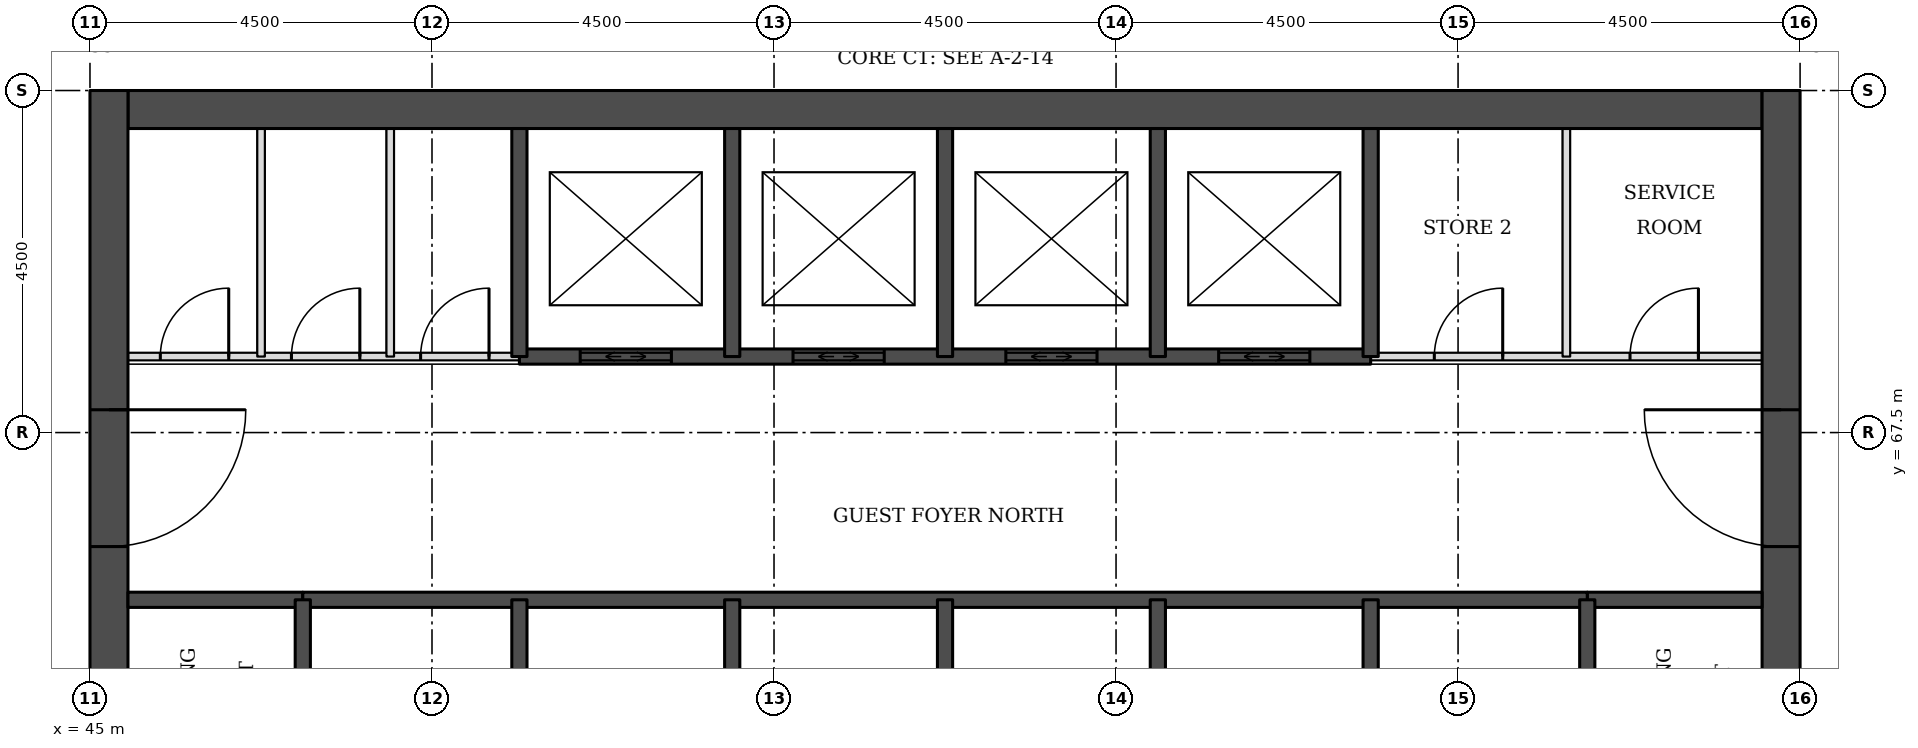
"""IFC4 building model, lengths in metres.
Left out: names, types, materials, properties, quantities, classifications, styles, units other than length and angle.
Written with IfcOpenShell. Run it as: python <this file> out.ifc"""

import sys

from ifc_helpers import new_model, si_unit, direction, frame, frame_2d, origin, place, context, subcontext, project, spatial, rectangle, extrude, element, fill, save


model = new_model("IFC4")
c1 = context("Model", 3, precision=1e-05, world=origin(), true_north=direction((0.0, 1.0)))
c2 = subcontext(c1, "Body", "Model", "MODEL_VIEW")
j1 = project(units=[si_unit("LENGTHUNIT", "METRE"), si_unit("PLANEANGLEUNIT", "RADIAN")], contexts=[c1])
p1 = place(None, origin())
s1 = spatial("IfcSite", under=j1, at=p1, CompositionType="ELEMENT")
p2 = place(p1, origin())
s2 = spatial("IfcBuilding", under=s1, at=p2, CompositionType="ELEMENT")
p3 = place(p2, frame((0.0, 0.0, 46.2)))
s3 = spatial("IfcBuildingStorey", under=s2, at=p3, CompositionType="ELEMENT", Elevation=46.2)
p4 = place(p3, frame((45.5, 71.75, 0.0), z_axis=(0.0, 0.0, 1.0), x_axis=(1.0, 0.0, 0.0)))
e1 = element("IfcWall", 1, at=p4, inside=s3, PredefinedType="SHEAR", context=c2, shape_type="SweptSolid", body=[
    extrude(rectangle(XDim=21.5, YDim=0.5, at=frame_2d((10.75, 0.0))), origin(), (0.0, 0.0, 1.0), 3.3),
])
p5 = place(p3, frame((45.25, 49.5, 0.0), z_axis=(0.0, 0.0, 1.0), x_axis=(0.0, 1.0, 0.0)))
e2 = element("IfcWall", 2, at=p5, inside=s3, PredefinedType="SHEAR", context=c2, shape_type="SweptSolid", body=[
    extrude(rectangle(XDim=22.5, YDim=0.5, at=frame_2d((11.25, 0.0))), origin(), (0.0, 0.0, 1.0), 3.3),
])
p6 = place(p5, frame((4.2, 0.0, 0.0)))
e3 = element("IfcOpeningElement", 3, at=p6, cuts=e2, PredefinedType="OPENING", context=c2, shape_type="SweptSolid", body=[
    extrude(rectangle(XDim=1.8, YDim=2.1, at=frame_2d((0.9, 1.05))), frame((0.0, 0.26, 0.0), z_axis=(0.0, -1.0, 0.0), x_axis=(1.0, 0.0, 0.0)), (0.0, 0.0, 1.0), 0.52),
])
p7 = place(p5, frame((6.9, 0.0, 0.0)))
e4 = element("IfcOpeningElement", 4, at=p7, cuts=e2, PredefinedType="OPENING", context=c2, shape_type="SweptSolid", body=[
    extrude(rectangle(XDim=1.1, YDim=2.1, at=frame_2d((0.55, 1.05))), frame((0.0, 0.26, 0.0), z_axis=(0.0, -1.0, 0.0), x_axis=(1.0, 0.0, 0.0)), (0.0, 0.0, 1.0), 0.52),
])
p8 = place(p5, frame((13.6, 0.0, 0.0)))
e5 = element("IfcOpeningElement", 5, at=p8, cuts=e2, PredefinedType="OPENING", context=c2, shape_type="SweptSolid", body=[
    extrude(rectangle(XDim=1.1, YDim=2.1, at=frame_2d((0.55, 1.05))), frame((0.0, 0.26, 0.0), z_axis=(0.0, -1.0, 0.0), x_axis=(1.0, 0.0, 0.0)), (0.0, 0.0, 1.0), 0.52),
])
p9 = place(p5, frame((16.5, 0.0, 0.0)))
e6 = element("IfcOpeningElement", 6, at=p9, cuts=e2, PredefinedType="OPENING", context=c2, shape_type="SweptSolid", body=[
    extrude(rectangle(XDim=1.8, YDim=2.1, at=frame_2d((0.9, 1.05))), frame((0.0, 0.26, 0.0), z_axis=(0.0, -1.0, 0.0), x_axis=(1.0, 0.0, 0.0)), (0.0, 0.0, 1.0), 0.52),
])
p10 = place(p3, frame((67.25, 49.5, 0.0), z_axis=(0.0, 0.0, 1.0), x_axis=(0.0, 1.0, 0.0)))
e7 = element("IfcWall", 7, at=p10, inside=s3, PredefinedType="SHEAR", context=c2, shape_type="SweptSolid", body=[
    extrude(rectangle(XDim=22.5, YDim=0.5, at=frame_2d((11.25, 0.0))), origin(), (0.0, 0.0, 1.0), 3.3),
])
p11 = place(p10, frame((4.2, 0.0, 0.0)))
e8 = element("IfcOpeningElement", 8, at=p11, cuts=e7, PredefinedType="OPENING", context=c2, shape_type="SweptSolid", body=[
    extrude(rectangle(XDim=1.8, YDim=2.1, at=frame_2d((0.9, 1.05))), frame((0.0, 0.26, 0.0), z_axis=(0.0, -1.0, 0.0), x_axis=(1.0, 0.0, 0.0)), (0.0, 0.0, 1.0), 0.52),
])
p12 = place(p10, frame((6.9, 0.0, 0.0)))
e9 = element("IfcOpeningElement", 9, at=p12, cuts=e7, PredefinedType="OPENING", context=c2, shape_type="SweptSolid", body=[
    extrude(rectangle(XDim=1.1, YDim=2.1, at=frame_2d((0.55, 1.05))), frame((0.0, 0.26, 0.0), z_axis=(0.0, -1.0, 0.0), x_axis=(1.0, 0.0, 0.0)), (0.0, 0.0, 1.0), 0.52),
])
p13 = place(p10, frame((13.6, 0.0, 0.0)))
e10 = element("IfcOpeningElement", 10, at=p13, cuts=e7, PredefinedType="OPENING", context=c2, shape_type="SweptSolid", body=[
    extrude(rectangle(XDim=1.1, YDim=2.1, at=frame_2d((0.55, 1.05))), frame((0.0, 0.26, 0.0), z_axis=(0.0, -1.0, 0.0), x_axis=(1.0, 0.0, 0.0)), (0.0, 0.0, 1.0), 0.52),
])
p14 = place(p10, frame((16.5, 0.0, 0.0)))
e11 = element("IfcOpeningElement", 11, at=p14, cuts=e7, PredefinedType="OPENING", context=c2, shape_type="SweptSolid", body=[
    extrude(rectangle(XDim=1.8, YDim=2.1, at=frame_2d((0.9, 1.05))), frame((0.0, 0.26, 0.0), z_axis=(0.0, -1.0, 0.0), x_axis=(1.0, 0.0, 0.0)), (0.0, 0.0, 1.0), 0.52),
])
for number, where, z_axis, x_axis in (
    (12, (45.5, 65.3, 0.0), (0.0, 0.0, 1.0), (1.0, 0.0, 0.0)),
    (13, (64.7, 65.3, 0.0), (0.0, 0.0, 1.0), (1.0, 0.0, 0.0)),
):
    element("IfcWall", number, at=place(p3, frame(where, z_axis=z_axis, x_axis=x_axis)), inside=s3, PredefinedType="SOLIDWALL", context=c2, shape_type="SweptSolid", body=[
        extrude(rectangle(XDim=2.3, YDim=0.2, at=frame_2d((1.15, 0.0))), origin(), (0.0, 0.0, 1.0), 3.08),
    ])
p15 = place(p3, frame((47.8, 65.3, 0.0), z_axis=(0.0, 0.0, 1.0), x_axis=(1.0, 0.0, 0.0)))
e14 = element("IfcWall", 14, at=p15, inside=s3, PredefinedType="SOLIDWALL", context=c2, shape_type="SweptSolid", body=[
    extrude(rectangle(XDim=16.9, YDim=0.2, at=frame_2d((8.45, 0.0))), origin(), (0.0, 0.0, 1.0), 3.08),
])
p16 = place(p3, frame((45.5, 68.5, 0.0), z_axis=(0.0, 0.0, 1.0), x_axis=(1.0, 0.0, 0.0)))
e15 = element("IfcWall", 15, at=p16, inside=s3, PredefinedType="PARTITIONING", context=c2, shape_type="SweptSolid", body=[
    extrude(rectangle(XDim=5.15, YDim=0.1, at=frame_2d((2.575, 0.0))), origin(), (0.0, 0.0, 1.0), 3.08),
])
p17 = place(p16, frame((0.426, 0.0, 0.0)))
e16 = element("IfcOpeningElement", 16, at=p17, cuts=e15, PredefinedType="OPENING", context=c2, shape_type="SweptSolid", body=[
    extrude(rectangle(XDim=0.9, YDim=2.1, at=frame_2d((0.45, 1.05))), frame((0.0, 0.06, 0.0), z_axis=(0.0, -1.0, 0.0), x_axis=(1.0, 0.0, 0.0)), (0.0, 0.0, 1.0), 0.12),
])
p18 = place(p16, frame((2.151, 0.0, 0.0)))
e17 = element("IfcOpeningElement", 17, at=p18, cuts=e15, PredefinedType="OPENING", context=c2, shape_type="SweptSolid", body=[
    extrude(rectangle(XDim=0.9, YDim=2.1, at=frame_2d((0.45, 1.05))), frame((0.0, 0.06, 0.0), z_axis=(0.0, -1.0, 0.0), x_axis=(1.0, 0.0, 0.0)), (0.0, 0.0, 1.0), 0.12),
])
p19 = place(p16, frame((3.85, 0.0, 0.0)))
e18 = element("IfcOpeningElement", 18, at=p19, cuts=e15, PredefinedType="OPENING", context=c2, shape_type="SweptSolid", body=[
    extrude(rectangle(XDim=0.9, YDim=2.1, at=frame_2d((0.45, 1.05))), frame((0.0, 0.06, 0.0), z_axis=(0.0, -1.0, 0.0), x_axis=(1.0, 0.0, 0.0)), (0.0, 0.0, 1.0), 0.12),
])
p20 = place(p3, frame((61.85, 68.5, 0.0), z_axis=(0.0, 0.0, 1.0), x_axis=(1.0, 0.0, 0.0)))
e19 = element("IfcWall", 19, at=p20, inside=s3, PredefinedType="PARTITIONING", context=c2, shape_type="SweptSolid", body=[
    extrude(rectangle(XDim=5.15, YDim=0.1, at=frame_2d((2.575, 0.0))), origin(), (0.0, 0.0, 1.0), 3.08),
])
p21 = place(p20, frame((3.413, 0.0, 0.0)))
e20 = element("IfcOpeningElement", 20, at=p21, cuts=e19, PredefinedType="OPENING", context=c2, shape_type="SweptSolid", body=[
    extrude(rectangle(XDim=0.9, YDim=2.1, at=frame_2d((0.45, 1.05))), frame((0.0, 0.06, 0.0), z_axis=(0.0, -1.0, 0.0), x_axis=(1.0, 0.0, 0.0)), (0.0, 0.0, 1.0), 0.12),
])
p22 = place(p20, frame((0.837, 0.0, 0.0)))
e21 = element("IfcOpeningElement", 21, at=p22, cuts=e19, PredefinedType="OPENING", context=c2, shape_type="SweptSolid", body=[
    extrude(rectangle(XDim=0.9, YDim=2.1, at=frame_2d((0.45, 1.05))), frame((0.0, 0.06, 0.0), z_axis=(0.0, -1.0, 0.0), x_axis=(1.0, 0.0, 0.0)), (0.0, 0.0, 1.0), 0.12),
])
p23 = place(p3, frame((50.65, 68.5, 0.0), z_axis=(0.0, 0.0, 1.0), x_axis=(1.0, 0.0, 0.0)))
e22 = element("IfcWall", 22, at=p23, inside=s3, PredefinedType="SOLIDWALL", context=c2, shape_type="SweptSolid", body=[
    extrude(rectangle(XDim=11.2, YDim=0.2, at=frame_2d((5.6, 0.0))), origin(), (0.0, 0.0, 1.0), 3.08),
])
p24 = place(p23, frame((0.8, 0.0, 0.0)))
e23 = element("IfcOpeningElement", 23, at=p24, cuts=e22, PredefinedType="OPENING", context=c2, shape_type="SweptSolid", body=[
    extrude(rectangle(XDim=1.2, YDim=2.1, at=frame_2d((0.6, 1.05))), frame((0.0, 0.11, 0.0), z_axis=(0.0, -1.0, 0.0), x_axis=(1.0, 0.0, 0.0)), (0.0, 0.0, 1.0), 0.22),
])
p25 = place(p23, frame((3.6, 0.0, 0.0)))
e24 = element("IfcOpeningElement", 24, at=p25, cuts=e22, PredefinedType="OPENING", context=c2, shape_type="SweptSolid", body=[
    extrude(rectangle(XDim=1.2, YDim=2.1, at=frame_2d((0.6, 1.05))), frame((0.0, 0.11, 0.0), z_axis=(0.0, -1.0, 0.0), x_axis=(1.0, 0.0, 0.0)), (0.0, 0.0, 1.0), 0.22),
])
p26 = place(p23, frame((6.4, 0.0, 0.0)))
e25 = element("IfcOpeningElement", 25, at=p26, cuts=e22, PredefinedType="OPENING", context=c2, shape_type="SweptSolid", body=[
    extrude(rectangle(XDim=1.2, YDim=2.1, at=frame_2d((0.6, 1.05))), frame((0.0, 0.11, 0.0), z_axis=(0.0, -1.0, 0.0), x_axis=(1.0, 0.0, 0.0)), (0.0, 0.0, 1.0), 0.22),
])
p27 = place(p23, frame((9.2, 0.0, 0.0)))
e26 = element("IfcOpeningElement", 26, at=p27, cuts=e22, PredefinedType="OPENING", context=c2, shape_type="SweptSolid", body=[
    extrude(rectangle(XDim=1.2, YDim=2.1, at=frame_2d((0.6, 1.05))), frame((0.0, 0.11, 0.0), z_axis=(0.0, -1.0, 0.0), x_axis=(1.0, 0.0, 0.0)), (0.0, 0.0, 1.0), 0.22),
])
p28 = place(p3, frame((47.251, 68.5, 0.0), z_axis=(0.0, 0.0, 1.0), x_axis=(0.0, 1.0, 0.0)))
e27 = element("IfcWall", 27, at=p28, inside=s3, PredefinedType="PARTITIONING", context=c2, shape_type="SweptSolid", body=[
    extrude(rectangle(XDim=3.0, YDim=0.1, at=frame_2d((1.5, 0.0))), origin(), (0.0, 0.0, 1.0), 3.08),
])
p29 = place(p3, frame((47.8, 62.0, 0.0), z_axis=(0.0, 0.0, 1.0), x_axis=(0.0, 1.0, 0.0)))
e28 = element("IfcWall", 28, at=p29, inside=s3, PredefinedType="SOLIDWALL", context=c2, shape_type="SweptSolid", body=[
    extrude(rectangle(XDim=3.3, YDim=0.2, at=frame_2d((1.65, 0.0))), origin(), (0.0, 0.0, 1.0), 3.08),
])
p30 = place(p29, frame((1.1, 0.0, 0.0)))
e29 = element("IfcOpeningElement", 29, at=p30, cuts=e28, PredefinedType="OPENING", context=c2, shape_type="SweptSolid", body=[
    extrude(rectangle(XDim=1.1, YDim=2.1, at=frame_2d((0.55, 1.05))), frame((0.0, 0.11, 0.0), z_axis=(0.0, -1.0, 0.0), x_axis=(1.0, 0.0, 0.0)), (0.0, 0.0, 1.0), 0.22),
])
p31 = place(p3, frame((48.95, 68.5, 0.0), z_axis=(0.0, 0.0, 1.0), x_axis=(0.0, 1.0, 0.0)))
e30 = element("IfcWall", 30, at=p31, inside=s3, PredefinedType="PARTITIONING", context=c2, shape_type="SweptSolid", body=[
    extrude(rectangle(XDim=3.0, YDim=0.1, at=frame_2d((1.5, 0.0))), origin(), (0.0, 0.0, 1.0), 3.08),
])
p32 = place(p3, frame((50.65, 62.0, 0.0), z_axis=(0.0, 0.0, 1.0), x_axis=(0.0, 1.0, 0.0)))
e31 = element("IfcWall", 31, at=p32, inside=s3, PredefinedType="SOLIDWALL", context=c2, shape_type="SweptSolid", body=[
    extrude(rectangle(XDim=3.3, YDim=0.2, at=frame_2d((1.65, 0.0))), origin(), (0.0, 0.0, 1.0), 3.08),
])
p33 = place(p3, frame((50.65, 68.5, 0.0), z_axis=(0.0, 0.0, 1.0), x_axis=(0.0, 1.0, 0.0)))
e32 = element("IfcWall", 32, at=p33, inside=s3, PredefinedType="SOLIDWALL", context=c2, shape_type="SweptSolid", body=[
    extrude(rectangle(XDim=3.0, YDim=0.2, at=frame_2d((1.5, 0.0))), origin(), (0.0, 0.0, 1.0), 3.08),
])
p34 = place(p3, frame((53.45, 62.5, 0.0), z_axis=(0.0, 0.0, 1.0), x_axis=(0.0, 1.0, 0.0)))
e33 = element("IfcWall", 33, at=p34, inside=s3, PredefinedType="SOLIDWALL", context=c2, shape_type="SweptSolid", body=[
    extrude(rectangle(XDim=2.8, YDim=0.2, at=frame_2d((1.4, 0.0))), origin(), (0.0, 0.0, 1.0), 3.08),
])
p35 = place(p3, frame((53.45, 68.5, 0.0), z_axis=(0.0, 0.0, 1.0), x_axis=(0.0, 1.0, 0.0)))
e34 = element("IfcWall", 34, at=p35, inside=s3, PredefinedType="SOLIDWALL", context=c2, shape_type="SweptSolid", body=[
    extrude(rectangle(XDim=3.0, YDim=0.2, at=frame_2d((1.5, 0.0))), origin(), (0.0, 0.0, 1.0), 3.08),
])
p36 = place(p3, frame((56.25, 62.5, 0.0), z_axis=(0.0, 0.0, 1.0), x_axis=(0.0, 1.0, 0.0)))
e35 = element("IfcWall", 35, at=p36, inside=s3, PredefinedType="SOLIDWALL", context=c2, shape_type="SweptSolid", body=[
    extrude(rectangle(XDim=2.8, YDim=0.2, at=frame_2d((1.4, 0.0))), origin(), (0.0, 0.0, 1.0), 3.08),
])
p37 = place(p3, frame((56.25, 68.5, 0.0), z_axis=(0.0, 0.0, 1.0), x_axis=(0.0, 1.0, 0.0)))
e36 = element("IfcWall", 36, at=p37, inside=s3, PredefinedType="SOLIDWALL", context=c2, shape_type="SweptSolid", body=[
    extrude(rectangle(XDim=3.0, YDim=0.2, at=frame_2d((1.5, 0.0))), origin(), (0.0, 0.0, 1.0), 3.08),
])
p38 = place(p3, frame((59.05, 62.5, 0.0), z_axis=(0.0, 0.0, 1.0), x_axis=(0.0, 1.0, 0.0)))
e37 = element("IfcWall", 37, at=p38, inside=s3, PredefinedType="SOLIDWALL", context=c2, shape_type="SweptSolid", body=[
    extrude(rectangle(XDim=2.8, YDim=0.2, at=frame_2d((1.4, 0.0))), origin(), (0.0, 0.0, 1.0), 3.08),
])
p39 = place(p3, frame((59.05, 68.5, 0.0), z_axis=(0.0, 0.0, 1.0), x_axis=(0.0, 1.0, 0.0)))
e38 = element("IfcWall", 38, at=p39, inside=s3, PredefinedType="SOLIDWALL", context=c2, shape_type="SweptSolid", body=[
    extrude(rectangle(XDim=3.0, YDim=0.2, at=frame_2d((1.5, 0.0))), origin(), (0.0, 0.0, 1.0), 3.08),
])
p40 = place(p3, frame((61.85, 62.0, 0.0), z_axis=(0.0, 0.0, 1.0), x_axis=(0.0, 1.0, 0.0)))
e39 = element("IfcWall", 39, at=p40, inside=s3, PredefinedType="SOLIDWALL", context=c2, shape_type="SweptSolid", body=[
    extrude(rectangle(XDim=3.3, YDim=0.2, at=frame_2d((1.65, 0.0))), origin(), (0.0, 0.0, 1.0), 3.08),
])
p41 = place(p3, frame((61.85, 68.5, 0.0), z_axis=(0.0, 0.0, 1.0), x_axis=(0.0, 1.0, 0.0)))
e40 = element("IfcWall", 40, at=p41, inside=s3, PredefinedType="SOLIDWALL", context=c2, shape_type="SweptSolid", body=[
    extrude(rectangle(XDim=3.0, YDim=0.2, at=frame_2d((1.5, 0.0))), origin(), (0.0, 0.0, 1.0), 3.08),
])
p42 = place(p3, frame((64.425, 68.5, 0.0), z_axis=(0.0, 0.0, 1.0), x_axis=(0.0, 1.0, 0.0)))
e41 = element("IfcWall", 41, at=p42, inside=s3, PredefinedType="PARTITIONING", context=c2, shape_type="SweptSolid", body=[
    extrude(rectangle(XDim=3.0, YDim=0.1, at=frame_2d((1.5, 0.0))), origin(), (0.0, 0.0, 1.0), 3.08),
])
p43 = place(p3, frame((64.7, 62.0, 0.0), z_axis=(0.0, 0.0, 1.0), x_axis=(0.0, 1.0, 0.0)))
e42 = element("IfcWall", 42, at=p43, inside=s3, PredefinedType="SOLIDWALL", context=c2, shape_type="SweptSolid", body=[
    extrude(rectangle(XDim=3.3, YDim=0.2, at=frame_2d((1.65, 0.0))), origin(), (0.0, 0.0, 1.0), 3.08),
])
p44 = place(p43, frame((1.1, 0.0, 0.0)))
e43 = element("IfcOpeningElement", 43, at=p44, cuts=e42, PredefinedType="OPENING", context=c2, shape_type="SweptSolid", body=[
    extrude(rectangle(XDim=1.1, YDim=2.1, at=frame_2d((0.55, 1.05))), frame((0.0, 0.11, 0.0), z_axis=(0.0, -1.0, 0.0), x_axis=(1.0, 0.0, 0.0)), (0.0, 0.0, 1.0), 0.22),
])
p45 = place(p24, origin())
e44 = element("IfcDoor", 44, at=p45, inside=s3, OperationType="DOUBLE_DOOR_SLIDING", PredefinedType="DOOR", context=c2, shape_type="SweptSolid", body=[
    extrude(rectangle(XDim=1.2, YDim=2.1, at=frame_2d((0.6, 1.05))), frame((0.0, 0.025, 0.0), z_axis=(0.0, -1.0, 0.0), x_axis=(1.0, 0.0, 0.0)), (0.0, 0.0, 1.0), 0.05),
])
fill(e23, e44)
p46 = place(p25, origin())
e45 = element("IfcDoor", 45, at=p46, inside=s3, OperationType="DOUBLE_DOOR_SLIDING", PredefinedType="DOOR", context=c2, shape_type="SweptSolid", body=[
    extrude(rectangle(XDim=1.2, YDim=2.1, at=frame_2d((0.6, 1.05))), frame((0.0, 0.025, 0.0), z_axis=(0.0, -1.0, 0.0), x_axis=(1.0, 0.0, 0.0)), (0.0, 0.0, 1.0), 0.05),
])
fill(e24, e45)
p47 = place(p26, origin())
e46 = element("IfcDoor", 46, at=p47, inside=s3, OperationType="DOUBLE_DOOR_SLIDING", PredefinedType="DOOR", context=c2, shape_type="SweptSolid", body=[
    extrude(rectangle(XDim=1.2, YDim=2.1, at=frame_2d((0.6, 1.05))), frame((0.0, 0.025, 0.0), z_axis=(0.0, -1.0, 0.0), x_axis=(1.0, 0.0, 0.0)), (0.0, 0.0, 1.0), 0.05),
])
fill(e25, e46)
p48 = place(p27, origin())
e47 = element("IfcDoor", 47, at=p48, inside=s3, OperationType="DOUBLE_DOOR_SLIDING", PredefinedType="DOOR", context=c2, shape_type="SweptSolid", body=[
    extrude(rectangle(XDim=1.2, YDim=2.1, at=frame_2d((0.6, 1.05))), frame((0.0, 0.025, 0.0), z_axis=(0.0, -1.0, 0.0), x_axis=(1.0, 0.0, 0.0)), (0.0, 0.0, 1.0), 0.05),
])
fill(e26, e47)
p49 = place(p9, frame((1.8, 0.0, 0.0), z_axis=(0.0, 0.0, 1.0), x_axis=(-1.0, 0.0, 0.0)))
e48 = element("IfcDoor", 48, at=p49, inside=s3, OperationType="SINGLE_SWING_LEFT", PredefinedType="DOOR", context=c2, shape_type="SweptSolid", body=[
    extrude(rectangle(XDim=1.8, YDim=2.1, at=frame_2d((0.9, 1.05))), frame((0.0, 0.025, 0.0), z_axis=(0.0, -1.0, 0.0), x_axis=(1.0, 0.0, 0.0)), (0.0, 0.0, 1.0), 0.05),
])
fill(e6, e48)
p50 = place(p14, origin())
e49 = element("IfcDoor", 49, at=p50, inside=s3, OperationType="SINGLE_SWING_RIGHT", PredefinedType="DOOR", context=c2, shape_type="SweptSolid", body=[
    extrude(rectangle(XDim=1.8, YDim=2.1, at=frame_2d((0.9, 1.05))), frame((0.0, 0.025, 0.0), z_axis=(0.0, -1.0, 0.0), x_axis=(1.0, 0.0, 0.0)), (0.0, 0.0, 1.0), 0.05),
])
fill(e11, e49)
p51 = place(p21, origin())
e50 = element("IfcDoor", 50, at=p51, inside=s3, OperationType="SINGLE_SWING_RIGHT", PredefinedType="DOOR", context=c2, shape_type="SweptSolid", body=[
    extrude(rectangle(XDim=0.9, YDim=2.1, at=frame_2d((0.45, 1.05))), frame((0.0, 0.025, 0.0), z_axis=(0.0, -1.0, 0.0), x_axis=(1.0, 0.0, 0.0)), (0.0, 0.0, 1.0), 0.05),
])
fill(e20, e50)
p52 = place(p22, origin())
e51 = element("IfcDoor", 51, at=p52, inside=s3, OperationType="SINGLE_SWING_RIGHT", PredefinedType="DOOR", context=c2, shape_type="SweptSolid", body=[
    extrude(rectangle(XDim=0.9, YDim=2.1, at=frame_2d((0.45, 1.05))), frame((0.0, 0.025, 0.0), z_axis=(0.0, -1.0, 0.0), x_axis=(1.0, 0.0, 0.0)), (0.0, 0.0, 1.0), 0.05),
])
fill(e21, e51)
p53 = place(p17, origin())
e52 = element("IfcDoor", 52, at=p53, inside=s3, OperationType="SINGLE_SWING_RIGHT", PredefinedType="DOOR", context=c2, shape_type="SweptSolid", body=[
    extrude(rectangle(XDim=0.9, YDim=2.1, at=frame_2d((0.45, 1.05))), frame((0.0, 0.025, 0.0), z_axis=(0.0, -1.0, 0.0), x_axis=(1.0, 0.0, 0.0)), (0.0, 0.0, 1.0), 0.05),
])
fill(e16, e52)
p54 = place(p18, origin())
e53 = element("IfcDoor", 53, at=p54, inside=s3, OperationType="SINGLE_SWING_RIGHT", PredefinedType="DOOR", context=c2, shape_type="SweptSolid", body=[
    extrude(rectangle(XDim=0.9, YDim=2.1, at=frame_2d((0.45, 1.05))), frame((0.0, 0.025, 0.0), z_axis=(0.0, -1.0, 0.0), x_axis=(1.0, 0.0, 0.0)), (0.0, 0.0, 1.0), 0.05),
])
fill(e17, e53)
p55 = place(p19, origin())
e54 = element("IfcDoor", 54, at=p55, inside=s3, OperationType="SINGLE_SWING_RIGHT", PredefinedType="DOOR", context=c2, shape_type="SweptSolid", body=[
    extrude(rectangle(XDim=0.9, YDim=2.1, at=frame_2d((0.45, 1.05))), frame((0.0, 0.025, 0.0), z_axis=(0.0, -1.0, 0.0), x_axis=(1.0, 0.0, 0.0)), (0.0, 0.0, 1.0), 0.05),
])
fill(e18, e54)
save(model, sys.argv[1])
